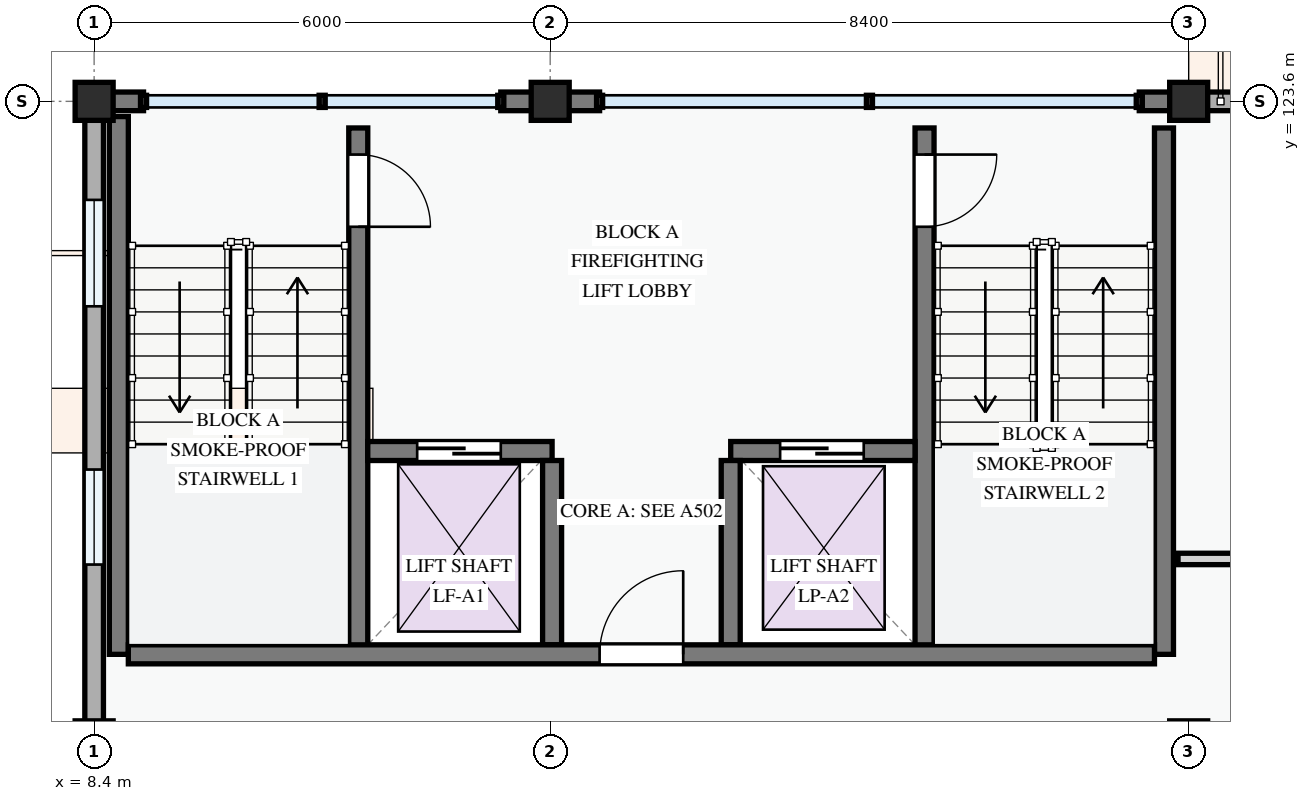
"""IFC4 building model, lengths in metres.
Left out: names, types, materials, properties, quantities, classifications, styles, units other than length and angle.
Written with IfcOpenShell. Run it as: python <this file> out.ifc"""

import sys

from ifc_helpers import new_model, si_unit, direction, frame, frame_2d, origin, origin_2d, place, context, subcontext, project, spatial, rectangle, extrude, element, fill, save


model = new_model("IFC4")
c1 = context("Model", 3, precision=1e-05, world=origin(), true_north=direction((0.0, 1.0)))
c2 = subcontext(c1, "Body", "Model", "MODEL_VIEW")
j1 = project(units=[si_unit("LENGTHUNIT", "METRE"), si_unit("PLANEANGLEUNIT", "RADIAN")], contexts=[c1])
p1 = place(None, origin())
s1 = spatial("IfcSite", under=j1, at=p1, CompositionType="ELEMENT")
p2 = place(p1, origin())
s2 = spatial("IfcBuilding", under=s1, at=p2, CompositionType="ELEMENT")
p3 = place(p2, frame((0.0, 0.0, 41.1)))
s3 = spatial("IfcBuildingStorey", under=s2, at=p3, CompositionType="ELEMENT", Elevation=41.1)
for number, where, z_axis, x_axis in (
    (1, (8.4, 123.6, 0.0), (0.0, 0.0, 1.0), (1.0, 0.0, 0.0)),
    (2, (14.4, 123.6, 0.0), (0.0, 0.0, 1.0), (1.0, 0.0, 0.0)),
    (3, (22.8, 123.6, 0.0), (0.0, 0.0, 1.0), (1.0, 0.0, 0.0)),
):
    element("IfcColumn", number, at=place(p3, frame(where, z_axis=z_axis, x_axis=x_axis)), inside=s3, PredefinedType="COLUMN", context=c2, shape_type="SweptSolid", body=[
        extrude(rectangle(XDim=0.5, YDim=0.5, at=origin_2d()), origin(), (0.0, 0.0, 1.0), 3.3),
    ])
p4 = place(p3, frame((28.8, 123.6, 0.0), z_axis=(0.0, 0.0, 1.0), x_axis=(-1.0, 0.0, 0.0)))
e4 = element("IfcWall", 4, at=p4, inside=s3, PredefinedType="STANDARD", context=c2, shape_type="SweptSolid", body=[
    extrude(rectangle(XDim=6.0, YDim=0.245, at=frame_2d((3.0, 0.0))), origin(), (0.0, 0.0, 1.0), 2.445),
])
p5 = place(p4, frame((0.62, 0.0, 0.0)))
e5 = element("IfcOpeningElement", 5, at=p5, cuts=e4, PredefinedType="OPENING", context=c2, shape_type="SweptSolid", body=[
    extrude(rectangle(XDim=1.25, YDim=2.2, at=frame_2d((0.625, 1.1))), frame((0.0, 0.133, 0.0), z_axis=(0.0, -1.0, 0.0), x_axis=(1.0, 0.0, 0.0)), (0.0, 0.0, 1.0), 0.265),
])
p6 = place(p4, frame((3.09, 0.0, 0.78)))
e6 = element("IfcOpeningElement", 6, at=p6, cuts=e4, PredefinedType="OPENING", context=c2, shape_type="SweptSolid", body=[
    extrude(rectangle(XDim=1.55, YDim=1.4, at=frame_2d((0.775, 0.7))), frame((0.0, 0.133, 0.0), z_axis=(0.0, -1.0, 0.0), x_axis=(1.0, 0.0, 0.0)), (0.0, 0.0, 1.0), 0.265),
])
for number, where, z_axis, x_axis in (
    (7, (22.8, 123.6, 0.0), (0.0, 0.0, 1.0), (-1.0, 0.0, 0.0)),
    (8, (15.05, 123.6, 0.0), (0.0, 0.0, 1.0), (-1.0, 0.0, 0.0)),
):
    element("IfcWall", number, at=place(p3, frame(where, z_axis=z_axis, x_axis=x_axis)), inside=s3, PredefinedType="STANDARD", context=c2, shape_type="SweptSolid", body=[
        extrude(rectangle(XDim=0.65, YDim=0.245, at=frame_2d((0.325, 0.0))), origin(), (0.0, 0.0, 1.0), 3.04),
    ])
p7 = place(p3, frame((14.4, 123.6, 0.0), z_axis=(0.0, 0.0, 1.0), x_axis=(-1.0, 0.0, 0.0)))
e9 = element("IfcWall", 9, at=p7, inside=s3, PredefinedType="STANDARD", context=c2, shape_type="SweptSolid", body=[
    extrude(rectangle(XDim=0.65, YDim=0.245, at=frame_2d((0.325, 0.0))), origin(), (0.0, 0.0, 1.0), 3.04),
])
p8 = place(p3, frame((9.05, 123.6, 0.0), z_axis=(0.0, 0.0, 1.0), x_axis=(-1.0, 0.0, 0.0)))
e10 = element("IfcWall", 10, at=p8, inside=s3, PredefinedType="STANDARD", context=c2, shape_type="SweptSolid", body=[
    extrude(rectangle(XDim=0.526, YDim=0.245, at=frame_2d((0.263, 0.0))), origin(), (0.0, 0.0, 1.0), 3.04),
])
p9 = place(p3, frame((8.4, 123.6, 0.0), z_axis=(0.0, 0.0, 1.0), x_axis=(0.0, -1.0, 0.0)))
e11 = element("IfcWall", 11, at=p9, inside=s3, PredefinedType="STANDARD", context=c2, shape_type="SweptSolid", body=[
    extrude(rectangle(XDim=8.4, YDim=0.245, at=frame_2d((4.2, 0.0))), origin(), (0.0, 0.0, 1.0), 2.345),
])
p10 = place(p9, frame((1.296, 0.0, 0.78)))
e12 = element("IfcOpeningElement", 12, at=p10, cuts=e11, PredefinedType="OPENING", context=c2, shape_type="SweptSolid", body=[
    extrude(rectangle(XDim=1.4, YDim=1.45, at=frame_2d((0.7, 0.725))), frame((0.0, 0.133, 0.0), z_axis=(0.0, -1.0, 0.0), x_axis=(1.0, 0.0, 0.0)), (0.0, 0.0, 1.0), 0.265),
])
p11 = place(p9, frame((4.844, 0.0, 0.78)))
e13 = element("IfcOpeningElement", 13, at=p11, cuts=e11, PredefinedType="OPENING", context=c2, shape_type="SweptSolid", body=[
    extrude(rectangle(XDim=1.25, YDim=1.45, at=frame_2d((0.625, 0.725))), frame((0.0, 0.133, 0.0), z_axis=(0.0, -1.0, 0.0), x_axis=(1.0, 0.0, 0.0)), (0.0, 0.0, 1.0), 0.265),
])
p12 = place(p3, frame((11.875, 123.25, 0.0), z_axis=(0.0, 0.0, 1.0), x_axis=(0.0, -1.0, 0.0)))
e14 = element("IfcWall", 14, at=p12, inside=s3, PredefinedType="SHEAR", context=c2, shape_type="SweptSolid", body=[
    extrude(rectangle(XDim=6.925, YDim=0.25, at=frame_2d((3.462, 0.0))), origin(), (0.0, 0.0, 1.0), 3.0),
])
p13 = place(p12, frame((0.35, 0.0, 0.0)))
e15 = element("IfcOpeningElement", 15, at=p13, cuts=e14, PredefinedType="OPENING", context=c2, shape_type="SweptSolid", body=[
    extrude(rectangle(XDim=0.95, YDim=2.1, at=frame_2d((0.475, 1.05))), frame((0.0, 0.135, 0.0), z_axis=(0.0, -1.0, 0.0), x_axis=(1.0, 0.0, 0.0)), (0.0, 0.0, 1.0), 0.27),
])
p14 = place(p3, frame((8.725, 123.4, 0.0), z_axis=(0.0, 0.0, 1.0), x_axis=(0.0, -1.0, 0.0)))
e16 = element("IfcWall", 16, at=p14, inside=s3, PredefinedType="SHEAR", context=c2, shape_type="SweptSolid", body=[
    extrude(rectangle(XDim=7.075, YDim=0.25, at=frame_2d((3.538, 0.0))), origin(), (0.0, 0.0, 1.0), 3.0),
])
p15 = place(p3, frame((22.475, 123.25, 0.0), z_axis=(0.0, 0.0, 1.0), x_axis=(0.0, -1.0, 0.0)))
e17 = element("IfcWall", 17, at=p15, inside=s3, PredefinedType="SHEAR", context=c2, shape_type="SweptSolid", body=[
    extrude(rectangle(XDim=6.925, YDim=0.25, at=frame_2d((3.462, 0.0))), origin(), (0.0, 0.0, 1.0), 3.0),
])
p16 = place(p3, frame((19.325, 123.25, 0.0), z_axis=(0.0, 0.0, 1.0), x_axis=(0.0, -1.0, 0.0)))
e18 = element("IfcWall", 18, at=p16, inside=s3, PredefinedType="SHEAR", context=c2, shape_type="SweptSolid", body=[
    extrude(rectangle(XDim=6.925, YDim=0.25, at=frame_2d((3.462, 0.0))), origin(), (0.0, 0.0, 1.0), 3.0),
])
p17 = place(p16, frame((0.35, 0.0, 0.0)))
e19 = element("IfcOpeningElement", 19, at=p17, cuts=e18, PredefinedType="OPENING", context=c2, shape_type="SweptSolid", body=[
    extrude(rectangle(XDim=0.95, YDim=2.1, at=frame_2d((0.475, 1.05))), frame((0.0, 0.135, 0.0), z_axis=(0.0, -1.0, 0.0), x_axis=(1.0, 0.0, 0.0)), (0.0, 0.0, 1.0), 0.27),
])
p18 = place(p3, frame((12.0, 119.0, 0.0), z_axis=(0.0, 0.0, 1.0), x_axis=(1.0, 0.0, 0.0)))
e20 = element("IfcWall", 20, at=p18, inside=s3, PredefinedType="SHEAR", context=c2, shape_type="SweptSolid", body=[
    extrude(rectangle(XDim=2.425, YDim=0.25, at=frame_2d((1.212, 0.0))), origin(), (0.0, 0.0, 1.0), 3.0),
])
p19 = place(p18, frame((0.65, 0.0, 0.0)))
e21 = element("IfcOpeningElement", 21, at=p19, cuts=e20, PredefinedType="OPENING", context=c2, shape_type="SweptSolid", body=[
    extrude(rectangle(XDim=1.1, YDim=2.15, at=frame_2d((0.55, 1.075))), frame((0.0, 0.135, 0.0), z_axis=(0.0, -1.0, 0.0), x_axis=(1.0, 0.0, 0.0)), (0.0, 0.0, 1.0), 0.27),
])
p20 = place(p3, frame((16.775, 119.0, 0.0), z_axis=(0.0, 0.0, 1.0), x_axis=(1.0, 0.0, 0.0)))
e22 = element("IfcWall", 22, at=p20, inside=s3, PredefinedType="SHEAR", context=c2, shape_type="SweptSolid", body=[
    extrude(rectangle(XDim=2.425, YDim=0.25, at=frame_2d((1.212, 0.0))), origin(), (0.0, 0.0, 1.0), 3.0),
])
p21 = place(p20, frame((0.65, 0.0, 0.0)))
e23 = element("IfcOpeningElement", 23, at=p21, cuts=e22, PredefinedType="OPENING", context=c2, shape_type="SweptSolid", body=[
    extrude(rectangle(XDim=1.1, YDim=2.15, at=frame_2d((0.55, 1.075))), frame((0.0, 0.135, 0.0), z_axis=(0.0, -1.0, 0.0), x_axis=(1.0, 0.0, 0.0)), (0.0, 0.0, 1.0), 0.27),
])
for number, where, z_axis, x_axis in (
    (24, (14.425, 118.875, 0.0), (0.0, 0.0, 1.0), (0.0, -1.0, 0.0)),
    (25, (16.775, 118.875, 0.0), (0.0, 0.0, 1.0), (0.0, -1.0, 0.0)),
):
    element("IfcWall", number, at=place(p3, frame(where, z_axis=z_axis, x_axis=x_axis)), inside=s3, PredefinedType="SHEAR", context=c2, shape_type="SweptSolid", body=[
        extrude(rectangle(XDim=2.425, YDim=0.25, at=frame_2d((1.212, 0.0))), origin(), (0.0, 0.0, 1.0), 3.0),
    ])
p22 = place(p3, frame((8.85, 116.325, 0.0), z_axis=(0.0, 0.0, 1.0), x_axis=(1.0, 0.0, 0.0)))
e26 = element("IfcWall", 26, at=p22, inside=s3, PredefinedType="SHEAR", context=c2, shape_type="SweptSolid", body=[
    extrude(rectangle(XDim=13.5, YDim=0.25, at=frame_2d((6.75, 0.0))), origin(), (0.0, 0.0, 1.0), 3.0),
])
p23 = place(p22, frame((6.2, 0.0, 0.0)))
e27 = element("IfcOpeningElement", 27, at=p23, cuts=e26, PredefinedType="OPENING", context=c2, shape_type="SweptSolid", body=[
    extrude(rectangle(XDim=1.1, YDim=2.15, at=frame_2d((0.55, 1.075))), frame((0.0, 0.135, 0.0), z_axis=(0.0, -1.0, 0.0), x_axis=(1.0, 0.0, 0.0)), (0.0, 0.0, 1.0), 0.27),
])
p24 = place(p3, frame((22.66, 117.58, 0.0), z_axis=(0.0, 0.0, 1.0), x_axis=(1.0, 0.0, 0.0)))
e28 = element("IfcWall", 28, at=p24, inside=s3, PredefinedType="PARTITIONING", context=c2, shape_type="SweptSolid", body=[
    extrude(rectangle(XDim=14.416, YDim=0.15, at=frame_2d((7.208, 0.0))), origin(), (0.0, 0.0, 1.0), 3.0),
])
p25 = place(p24, frame((2.74, 0.0, 0.0)))
e29 = element("IfcOpeningElement", 29, at=p25, cuts=e28, PredefinedType="OPENING", context=c2, shape_type="SweptSolid", body=[
    extrude(rectangle(XDim=0.96, YDim=2.12, at=frame_2d((0.48, 1.06))), frame((0.0, 0.085, 0.0), z_axis=(0.0, -1.0, 0.0), x_axis=(1.0, 0.0, 0.0)), (0.0, 0.0, 1.0), 0.17),
])
p26 = place(p10, origin())
e30 = element("IfcWindow", 30, at=p26, inside=s3, PartitioningType="SINGLE_PANEL", PredefinedType="WINDOW", context=c2, shape_type="SweptSolid", body=[
    extrude(rectangle(XDim=1.4, YDim=1.45, at=frame_2d((0.7, 0.725))), frame((0.0, 0.03, 0.0), z_axis=(0.0, -1.0, 0.0), x_axis=(1.0, 0.0, 0.0)), (0.0, 0.0, 1.0), 0.06),
])
fill(e12, e30)
p27 = place(p11, origin())
e31 = element("IfcWindow", 31, at=p27, inside=s3, PartitioningType="SINGLE_PANEL", PredefinedType="WINDOW", context=c2, shape_type="SweptSolid", body=[
    extrude(rectangle(XDim=1.25, YDim=1.45, at=frame_2d((0.625, 0.725))), frame((0.0, 0.03, 0.0), z_axis=(0.0, -1.0, 0.0), x_axis=(1.0, 0.0, 0.0)), (0.0, 0.0, 1.0), 0.06),
])
fill(e13, e31)
p28 = place(p13, origin())
e32 = element("IfcDoor", 32, at=p28, inside=s3, OperationType="SINGLE_SWING_RIGHT", PredefinedType="DOOR", context=c2, shape_type="SweptSolid", body=[
    extrude(rectangle(XDim=0.95, YDim=2.1, at=frame_2d((0.475, 1.05))), frame((0.0, 0.025, 0.0), z_axis=(0.0, -1.0, 0.0), x_axis=(1.0, 0.0, 0.0)), (0.0, 0.0, 1.0), 0.05),
])
fill(e15, e32)
p29 = place(p17, origin())
e33 = element("IfcDoor", 33, at=p29, inside=s3, OperationType="SINGLE_SWING_LEFT", PredefinedType="DOOR", context=c2, shape_type="SweptSolid", body=[
    extrude(rectangle(XDim=0.95, YDim=2.1, at=frame_2d((0.475, 1.05))), frame((0.0, 0.025, 0.0), z_axis=(0.0, -1.0, 0.0), x_axis=(1.0, 0.0, 0.0)), (0.0, 0.0, 1.0), 0.05),
])
fill(e19, e33)
p30 = place(p19, origin())
e34 = element("IfcDoor", 34, at=p30, inside=s3, OperationType="SLIDING_TO_LEFT", PredefinedType="DOOR", context=c2, shape_type="SweptSolid", body=[
    extrude(rectangle(XDim=1.1, YDim=2.15, at=frame_2d((0.55, 1.075))), frame((0.0, 0.025, 0.0), z_axis=(0.0, -1.0, 0.0), x_axis=(1.0, 0.0, 0.0)), (0.0, 0.0, 1.0), 0.05),
])
fill(e21, e34)
p31 = place(p21, origin())
e35 = element("IfcDoor", 35, at=p31, inside=s3, OperationType="SLIDING_TO_LEFT", PredefinedType="DOOR", context=c2, shape_type="SweptSolid", body=[
    extrude(rectangle(XDim=1.1, YDim=2.15, at=frame_2d((0.55, 1.075))), frame((0.0, 0.025, 0.0), z_axis=(0.0, -1.0, 0.0), x_axis=(1.0, 0.0, 0.0)), (0.0, 0.0, 1.0), 0.05),
])
fill(e23, e35)
p32 = place(p23, origin())
e36 = element("IfcDoor", 36, at=p32, inside=s3, OperationType="SINGLE_SWING_RIGHT", PredefinedType="DOOR", context=c2, shape_type="SweptSolid", body=[
    extrude(rectangle(XDim=1.1, YDim=2.15, at=frame_2d((0.55, 1.075))), frame((0.0, 0.025, 0.0), z_axis=(0.0, -1.0, 0.0), x_axis=(1.0, 0.0, 0.0)), (0.0, 0.0, 1.0), 0.05),
])
fill(e27, e36)
save(model, sys.argv[1])
